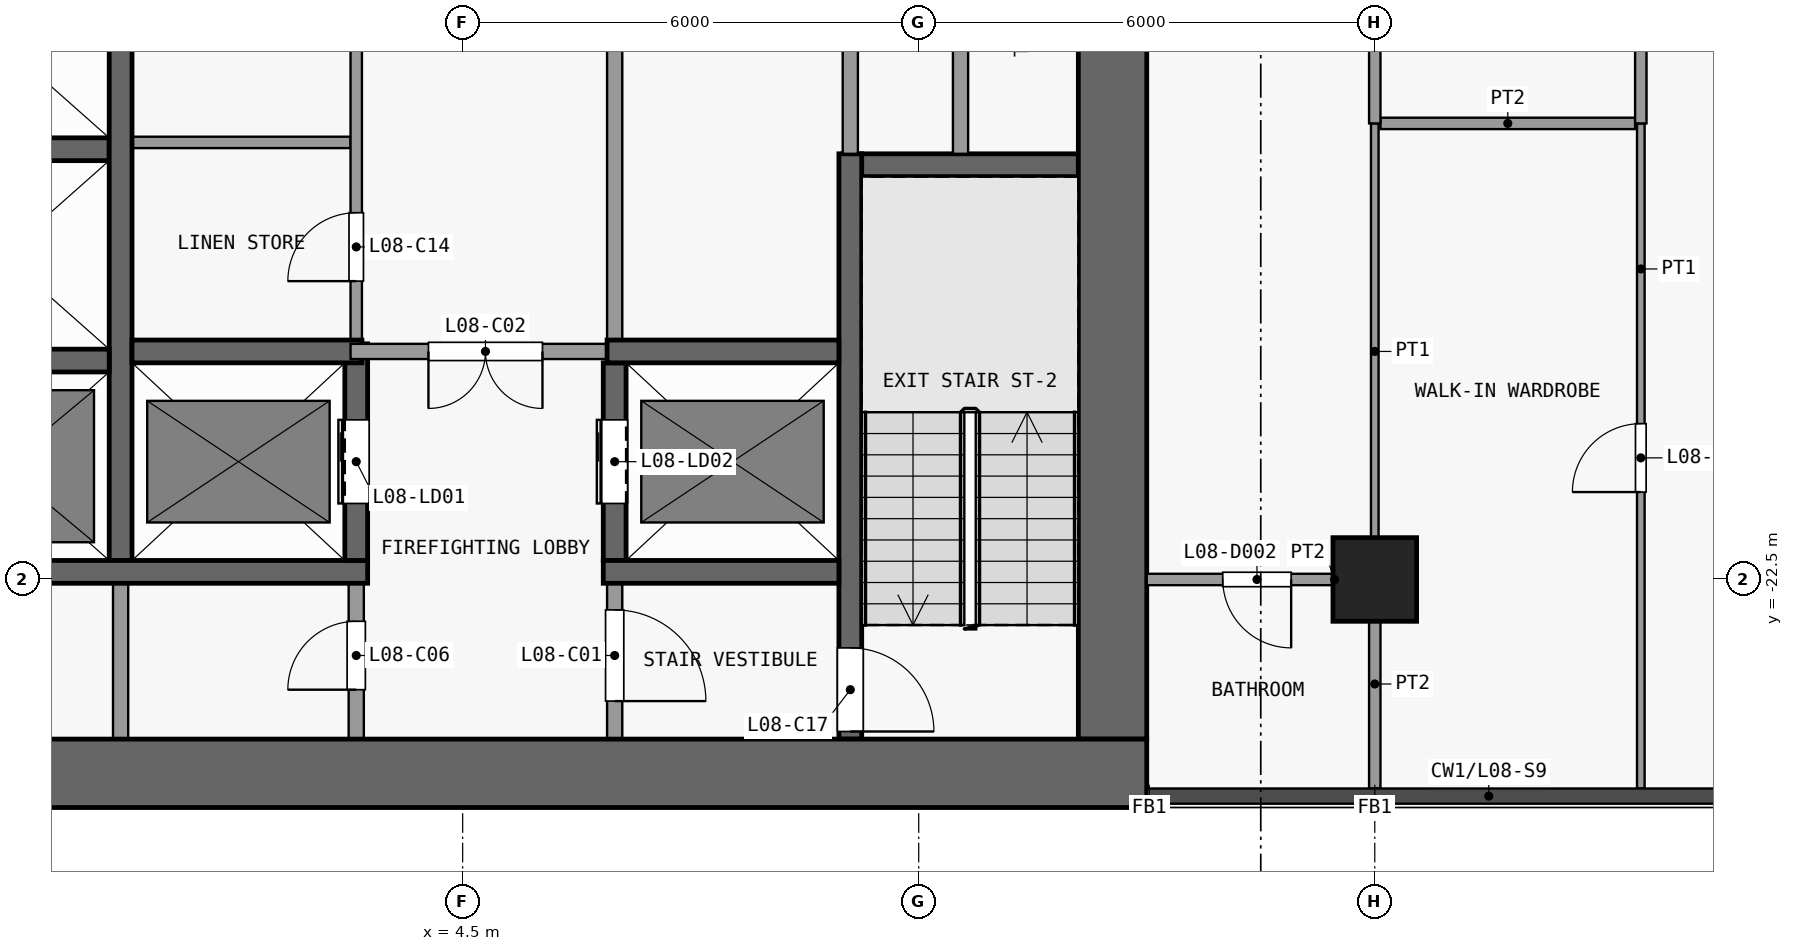
"""IFC4 building model, lengths in metres.
Left out: names, types, materials, properties, quantities, classifications, styles, units other than length and angle.
Written with IfcOpenShell. Run it as: python <this file> out.ifc"""

import sys

from ifc_helpers import new_model, si_unit, direction, frame, frame_2d, origin, origin_2d, place, context, subcontext, project, spatial, rectangle, extrude, element, fill, save


model = new_model("IFC4")
c1 = context("Model", 3, precision=1e-05, world=origin(), true_north=direction((0.0, 1.0)))
c2 = subcontext(c1, "Body", "Model", "MODEL_VIEW")
j1 = project(units=[si_unit("LENGTHUNIT", "METRE"), si_unit("PLANEANGLEUNIT", "RADIAN")], contexts=[c1])
p1 = place(None, origin())
s1 = spatial("IfcSite", under=j1, at=p1, CompositionType="ELEMENT")
p2 = place(p1, origin())
s2 = spatial("IfcBuilding", under=s1, at=p2, CompositionType="ELEMENT")
p3 = place(p2, frame((0.0, 0.0, 39.7)))
s3 = spatial("IfcBuildingStorey", under=s2, at=p3, CompositionType="ELEMENT", Elevation=39.7)
p4 = place(p3, frame((16.5, -22.5, 0.0), z_axis=(0.0, 0.0, 1.0), x_axis=(1.0, 0.0, 0.0)))
e1 = element("IfcColumn", 1, at=p4, inside=s3, PredefinedType="COLUMN", context=c2, shape_type="SweptSolid", body=[
    extrude(rectangle(XDim=1.1, YDim=1.1, at=origin_2d()), origin(), (0.0, 0.0, 1.0), 3.6),
])
p5 = place(p3, frame((-13.5, -25.05, 0.0), z_axis=(0.0, 0.0, 1.0), x_axis=(1.0, 0.0, 0.0)))
e2 = element("IfcWall", 2, at=p5, inside=s3, PredefinedType="SHEAR", context=c2, shape_type="SweptSolid", body=[
    extrude(rectangle(XDim=27.0, YDim=0.9, at=frame_2d((13.5, 0.0))), origin(), (0.0, 0.0, 1.0), 3.3),
])
p6 = place(p3, frame((13.05, -24.6, 0.0), z_axis=(0.0, 0.0, 1.0), x_axis=(0.0, 1.0, 0.0)))
e3 = element("IfcWall", 3, at=p6, inside=s3, PredefinedType="SHEAR", context=c2, shape_type="SweptSolid", body=[
    extrude(rectangle(XDim=16.1, YDim=0.9, at=frame_2d((8.05, 0.0))), origin(), (0.0, 0.0, 1.0), 3.3),
])
p7 = place(p3, frame((-2.95, -22.4, 0.0), z_axis=(0.0, 0.0, 1.0), x_axis=(1.0, 0.0, 0.0)))
e4 = element("IfcWall", 4, at=p7, inside=s3, PredefinedType="SHEAR", context=c2, shape_type="SweptSolid", body=[
    extrude(rectangle(XDim=6.2, YDim=0.3, at=frame_2d((3.1, 0.0))), origin(), (0.0, 0.0, 1.0), 3.3),
])
p8 = place(p3, frame((6.35, -22.4, 0.0), z_axis=(0.0, 0.0, 1.0), x_axis=(1.0, 0.0, 0.0)))
e5 = element("IfcWall", 5, at=p8, inside=s3, PredefinedType="SHEAR", context=c2, shape_type="SweptSolid", body=[
    extrude(rectangle(XDim=3.1, YDim=0.3, at=frame_2d((1.55, 0.0))), origin(), (0.0, 0.0, 1.0), 3.3),
])
p9 = place(p3, frame((-2.95, -19.62, 0.0), z_axis=(0.0, 0.0, 1.0), x_axis=(1.0, 0.0, 0.0)))
e6 = element("IfcWall", 6, at=p9, inside=s3, PredefinedType="SHEAR", context=c2, shape_type="SweptSolid", body=[
    extrude(rectangle(XDim=2.8, YDim=0.3, at=frame_2d((1.4, 0.0))), origin(), (0.0, 0.0, 1.0), 3.3),
])
p10 = place(p3, frame((0.15, -19.5, 0.0), z_axis=(0.0, 0.0, 1.0), x_axis=(1.0, 0.0, 0.0)))
e7 = element("IfcWall", 7, at=p10, inside=s3, PredefinedType="SHEAR", context=c2, shape_type="SweptSolid", body=[
    extrude(rectangle(XDim=3.025, YDim=0.3, at=frame_2d((1.513, 0.0))), origin(), (0.0, 0.0, 1.0), 3.3),
])
p11 = place(p3, frame((6.4, -19.5, 0.0), z_axis=(0.0, 0.0, 1.0), x_axis=(-1.0, 0.0, 0.0)))
e8 = element("IfcWall", 8, at=p11, inside=s3, PredefinedType="PARTITIONING", context=c2, shape_type="SweptSolid", body=[
    extrude(rectangle(XDim=3.375, YDim=0.2, at=frame_2d((1.688, 0.0))), origin(), (0.0, 0.0, 1.0), 3.3),
])
p12 = place(p11, frame((0.85, 0.0, 0.0)))
e9 = element("IfcOpeningElement", 9, at=p12, cuts=e8, PredefinedType="OPENING", context=c2, shape_type="SweptSolid", body=[
    extrude(rectangle(XDim=1.5, YDim=2.1, at=frame_2d((0.75, 1.05))), frame((0.0, 0.11, 0.0), z_axis=(0.0, -1.0, 0.0), x_axis=(1.0, 0.0, 0.0)), (0.0, 0.0, 1.0), 0.22),
])
p13 = place(p3, frame((6.4, -19.5, 0.0), z_axis=(0.0, 0.0, 1.0), x_axis=(1.0, 0.0, 0.0)))
e10 = element("IfcWall", 10, at=p13, inside=s3, PredefinedType="SHEAR", context=c2, shape_type="SweptSolid", body=[
    extrude(rectangle(XDim=3.05, YDim=0.3, at=frame_2d((1.525, 0.0))), origin(), (0.0, 0.0, 1.0), 3.3),
])
p14 = place(p3, frame((9.5, -17.05, 0.0), z_axis=(0.0, 0.0, 1.0), x_axis=(1.0, 0.0, 0.0)))
e11 = element("IfcWall", 11, at=p14, inside=s3, PredefinedType="SHEAR", context=c2, shape_type="SweptSolid", body=[
    extrude(rectangle(XDim=3.1, YDim=0.3, at=frame_2d((1.55, 0.0))), origin(), (0.0, 0.0, 1.0), 3.3),
])
p15 = place(p3, frame((-2.95, -16.84, 0.0), z_axis=(0.0, 0.0, 1.0), x_axis=(1.0, 0.0, 0.0)))
e12 = element("IfcWall", 12, at=p15, inside=s3, PredefinedType="SHEAR", context=c2, shape_type="SweptSolid", body=[
    extrude(rectangle(XDim=2.8, YDim=0.3, at=frame_2d((1.4, 0.0))), origin(), (0.0, 0.0, 1.0), 3.3),
])
p16 = place(p3, frame((0.15, -16.75, 0.0), z_axis=(0.0, 0.0, 1.0), x_axis=(1.0, 0.0, 0.0)))
e13 = element("IfcWall", 13, at=p16, inside=s3, PredefinedType="PARTITIONING", context=c2, shape_type="SweptSolid", body=[
    extrude(rectangle(XDim=2.875, YDim=0.15, at=frame_2d((1.438, 0.0))), origin(), (0.0, 0.0, 1.0), 3.3),
])
p17 = place(p3, frame((0.0, -24.6, 0.0), z_axis=(0.0, 0.0, 1.0), x_axis=(0.0, 1.0, 0.0)))
e14 = element("IfcWall", 14, at=p17, inside=s3, PredefinedType="PARTITIONING", context=c2, shape_type="SweptSolid", body=[
    extrude(rectangle(XDim=2.05, YDim=0.2, at=frame_2d((1.025, 0.0))), origin(), (0.0, 0.0, 1.0), 3.3),
])
p18 = place(p3, frame((0.0, -22.25, 0.0), z_axis=(0.0, 0.0, 1.0), x_axis=(0.0, 1.0, 0.0)))
e15 = element("IfcWall", 15, at=p18, inside=s3, PredefinedType="SHEAR", context=c2, shape_type="SweptSolid", body=[
    extrude(rectangle(XDim=13.75, YDim=0.3, at=frame_2d((6.875, 0.0))), origin(), (0.0, 0.0, 1.0), 3.3),
])
p19 = place(p3, frame((3.1, -24.6, 0.0), z_axis=(0.0, 0.0, 1.0), x_axis=(0.0, 1.0, 0.0)))
e16 = element("IfcWall", 16, at=p19, inside=s3, PredefinedType="PARTITIONING", context=c2, shape_type="SweptSolid", body=[
    extrude(rectangle(XDim=2.05, YDim=0.2, at=frame_2d((1.025, 0.0))), origin(), (0.0, 0.0, 1.0), 3.3),
])
p20 = place(p19, frame((0.65, 0.0, 0.0)))
e17 = element("IfcOpeningElement", 17, at=p20, cuts=e16, PredefinedType="OPENING", context=c2, shape_type="SweptSolid", body=[
    extrude(rectangle(XDim=0.9, YDim=2.1, at=frame_2d((0.45, 1.05))), frame((0.0, 0.11, 0.0), z_axis=(0.0, -1.0, 0.0), x_axis=(1.0, 0.0, 0.0)), (0.0, 0.0, 1.0), 0.22),
])
p21 = place(p3, frame((3.1, -22.25, 0.0), z_axis=(0.0, 0.0, 1.0), x_axis=(0.0, 1.0, 0.0)))
e18 = element("IfcWall", 18, at=p21, inside=s3, PredefinedType="SHEAR", context=c2, shape_type="SweptSolid", body=[
    extrude(rectangle(XDim=2.85, YDim=0.3, at=frame_2d((1.425, 0.0))), origin(), (0.0, 0.0, 1.0), 3.3),
])
p22 = place(p21, frame((0.75, 0.0, 0.0)))
e19 = element("IfcOpeningElement", 19, at=p22, cuts=e18, PredefinedType="OPENING", context=c2, shape_type="SweptSolid", body=[
    extrude(rectangle(XDim=1.1, YDim=2.1, at=frame_2d((0.55, 1.05))), frame((0.0, 0.16, 0.0), z_axis=(0.0, -1.0, 0.0), x_axis=(1.0, 0.0, 0.0)), (0.0, 0.0, 1.0), 0.32),
])
p23 = place(p3, frame((3.1, -19.4, 0.0), z_axis=(0.0, 0.0, 1.0), x_axis=(0.0, 1.0, 0.0)))
e20 = element("IfcWall", 20, at=p23, inside=s3, PredefinedType="PARTITIONING", context=c2, shape_type="SweptSolid", body=[
    extrude(rectangle(XDim=10.9, YDim=0.15, at=frame_2d((5.45, 0.0))), origin(), (0.0, 0.0, 1.0), 3.3),
])
p24 = place(p23, frame((0.825, 0.0, 0.0)))
e21 = element("IfcOpeningElement", 21, at=p24, cuts=e20, PredefinedType="OPENING", context=c2, shape_type="SweptSolid", body=[
    extrude(rectangle(XDim=0.9, YDim=2.1, at=frame_2d((0.45, 1.05))), frame((0.0, 0.085, 0.0), z_axis=(0.0, -1.0, 0.0), x_axis=(1.0, 0.0, 0.0)), (0.0, 0.0, 1.0), 0.17),
])
p25 = place(p23, frame((6.175, 0.0, 0.0)))
e22 = element("IfcOpeningElement", 22, at=p25, cuts=e20, PredefinedType="OPENING", context=c2, shape_type="SweptSolid", body=[
    extrude(rectangle(XDim=1.2, YDim=2.1, at=frame_2d((0.6, 1.05))), frame((0.0, 0.085, 0.0), z_axis=(0.0, -1.0, 0.0), x_axis=(1.0, 0.0, 0.0)), (0.0, 0.0, 1.0), 0.17),
])
p26 = place(p3, frame((6.5, -22.55, 0.0), z_axis=(0.0, 0.0, 1.0), x_axis=(0.0, -1.0, 0.0)))
e23 = element("IfcWall", 23, at=p26, inside=s3, PredefinedType="PARTITIONING", context=c2, shape_type="SweptSolid", body=[
    extrude(rectangle(XDim=2.05, YDim=0.2, at=frame_2d((1.025, 0.0))), origin(), (0.0, 0.0, 1.0), 3.3),
])
p27 = place(p26, frame((0.35, 0.0, 0.0)))
e24 = element("IfcOpeningElement", 24, at=p27, cuts=e23, PredefinedType="OPENING", context=c2, shape_type="SweptSolid", body=[
    extrude(rectangle(XDim=1.2, YDim=2.1, at=frame_2d((0.6, 1.05))), frame((0.0, 0.11, 0.0), z_axis=(0.0, -1.0, 0.0), x_axis=(1.0, 0.0, 0.0)), (0.0, 0.0, 1.0), 0.22),
])
p28 = place(p3, frame((6.5, -22.25, 0.0), z_axis=(0.0, 0.0, 1.0), x_axis=(0.0, 1.0, 0.0)))
e25 = element("IfcWall", 25, at=p28, inside=s3, PredefinedType="SHEAR", context=c2, shape_type="SweptSolid", body=[
    extrude(rectangle(XDim=2.6, YDim=0.3, at=frame_2d((1.3, 0.0))), origin(), (0.0, 0.0, 1.0), 3.3),
])
p29 = place(p28, frame((0.75, 0.0, 0.0)))
e26 = element("IfcOpeningElement", 26, at=p29, cuts=e25, PredefinedType="OPENING", context=c2, shape_type="SweptSolid", body=[
    extrude(rectangle(XDim=1.1, YDim=2.1, at=frame_2d((0.55, 1.05))), frame((0.0, 0.16, 0.0), z_axis=(0.0, -1.0, 0.0), x_axis=(1.0, 0.0, 0.0)), (0.0, 0.0, 1.0), 0.32),
])
p30 = place(p3, frame((6.5, -8.5, 0.0), z_axis=(0.0, 0.0, 1.0), x_axis=(0.0, -1.0, 0.0)))
e27 = element("IfcWall", 27, at=p30, inside=s3, PredefinedType="PARTITIONING", context=c2, shape_type="SweptSolid", body=[
    extrude(rectangle(XDim=10.85, YDim=0.2, at=frame_2d((5.425, 0.0))), origin(), (0.0, 0.0, 1.0), 3.3),
])
p31 = place(p30, frame((4.9, 0.0, 0.0)))
e28 = element("IfcOpeningElement", 28, at=p31, cuts=e27, PredefinedType="OPENING", context=c2, shape_type="SweptSolid", body=[
    extrude(rectangle(XDim=1.2, YDim=2.1, at=frame_2d((0.6, 1.05))), frame((0.0, 0.11, 0.0), z_axis=(0.0, -1.0, 0.0), x_axis=(1.0, 0.0, 0.0)), (0.0, 0.0, 1.0), 0.22),
])
p32 = place(p3, frame((9.6, -16.9, 0.0), z_axis=(0.0, 0.0, 1.0), x_axis=(0.0, -1.0, 0.0)))
e29 = element("IfcWall", 29, at=p32, inside=s3, PredefinedType="SHEAR", context=c2, shape_type="SweptSolid", body=[
    extrude(rectangle(XDim=7.7, YDim=0.3, at=frame_2d((3.85, 0.0))), origin(), (0.0, 0.0, 1.0), 3.3),
])
p33 = place(p32, frame((6.5, 0.0, 0.0)))
e30 = element("IfcOpeningElement", 30, at=p33, cuts=e29, PredefinedType="OPENING", context=c2, shape_type="SweptSolid", body=[
    extrude(rectangle(XDim=1.1, YDim=2.1, at=frame_2d((0.55, 1.05))), frame((0.0, 0.16, 0.0), z_axis=(0.0, -1.0, 0.0), x_axis=(1.0, 0.0, 0.0)), (0.0, 0.0, 1.0), 0.32),
])
p34 = place(p3, frame((9.6, -16.9, 0.0), z_axis=(0.0, 0.0, 1.0), x_axis=(0.0, 1.0, 0.0)))
e31 = element("IfcWall", 31, at=p34, inside=s3, PredefinedType="PARTITIONING", context=c2, shape_type="SweptSolid", body=[
    extrude(rectangle(XDim=8.4, YDim=0.2, at=frame_2d((4.2, 0.0))), origin(), (0.0, 0.0, 1.0), 3.3),
])
p35 = place(p3, frame((11.05, -10.5, 0.0), z_axis=(0.0, 0.0, 1.0), x_axis=(0.0, -1.0, 0.0)))
e32 = element("IfcWall", 32, at=p35, inside=s3, PredefinedType="PARTITIONING", context=c2, shape_type="SweptSolid", body=[
    extrude(rectangle(XDim=6.4, YDim=0.2, at=frame_2d((3.2, 0.0))), origin(), (0.0, 0.0, 1.0), 3.3),
])
p36 = place(p35, frame((2.875, 0.0, 0.0)))
e33 = element("IfcOpeningElement", 33, at=p36, cuts=e32, PredefinedType="OPENING", context=c2, shape_type="SweptSolid", body=[
    extrude(rectangle(XDim=0.9, YDim=2.1, at=frame_2d((0.45, 1.05))), frame((0.0, 0.11, 0.0), z_axis=(0.0, -1.0, 0.0), x_axis=(1.0, 0.0, 0.0)), (0.0, 0.0, 1.0), 0.22),
])
p37 = place(p3, frame((13.5, -22.5, 0.0), z_axis=(0.0, 0.0, 1.0), x_axis=(1.0, 0.0, 0.0)))
e34 = element("IfcWall", 34, at=p37, inside=s3, PredefinedType="PARTITIONING", context=c2, shape_type="SweptSolid", body=[
    extrude(rectangle(XDim=2.925, YDim=0.15, at=frame_2d((1.462, 0.0))), origin(), (0.0, 0.0, 1.0), 3.3),
])
p38 = place(p37, frame((1.0, 0.0, 0.0)))
e35 = element("IfcOpeningElement", 35, at=p38, cuts=e34, PredefinedType="OPENING", context=c2, shape_type="SweptSolid", body=[
    extrude(rectangle(XDim=0.9, YDim=2.1, at=frame_2d((0.45, 1.05))), frame((0.0, 0.085, 0.0), z_axis=(0.0, -1.0, 0.0), x_axis=(1.0, 0.0, 0.0)), (0.0, 0.0, 1.0), 0.17),
])
p39 = place(p3, frame((16.575, -16.5, 0.0), z_axis=(0.0, 0.0, 1.0), x_axis=(1.0, 0.0, 0.0)))
e36 = element("IfcWall", 36, at=p39, inside=s3, PredefinedType="PARTITIONING", context=c2, shape_type="SweptSolid", body=[
    extrude(rectangle(XDim=3.35, YDim=0.15, at=frame_2d((1.675, 0.0))), origin(), (0.0, 0.0, 1.0), 3.3),
])
p40 = place(p3, frame((16.5, -22.5, 0.0), z_axis=(0.0, 0.0, 1.0), x_axis=(0.0, 1.0, 0.0)))
e37 = element("IfcWall", 37, at=p40, inside=s3, PredefinedType="PARTITIONING", context=c2, shape_type="SweptSolid", body=[
    extrude(rectangle(XDim=6.0, YDim=0.1, at=frame_2d((3.0, 0.0))), origin(), (0.0, 0.0, 1.0), 3.3),
])
p41 = place(p3, frame((16.5, -25.25, 0.0), z_axis=(0.0, 0.0, 1.0), x_axis=(0.0, 1.0, 0.0)))
e38 = element("IfcWall", 38, at=p41, inside=s3, PredefinedType="PARTITIONING", context=c2, shape_type="SweptSolid", body=[
    extrude(rectangle(XDim=2.75, YDim=0.15, at=frame_2d((1.375, 0.0))), origin(), (0.0, 0.0, 1.0), 3.3),
])
p42 = place(p3, frame((16.5, -16.5, 0.0), z_axis=(0.0, 0.0, 1.0), x_axis=(0.0, 1.0, 0.0)))
e39 = element("IfcWall", 39, at=p42, inside=s3, PredefinedType="PARTITIONING", context=c2, shape_type="SweptSolid", body=[
    extrude(rectangle(XDim=8.5, YDim=0.15, at=frame_2d((4.25, 0.0))), origin(), (0.0, 0.0, 1.0), 3.3),
])
p43 = place(p42, frame((5.3, 0.0, 0.0)))
e40 = element("IfcOpeningElement", 40, at=p43, cuts=e39, PredefinedType="OPENING", context=c2, shape_type="SweptSolid", body=[
    extrude(rectangle(XDim=0.9, YDim=2.1, at=frame_2d((0.45, 1.05))), frame((0.0, 0.085, 0.0), z_axis=(0.0, -1.0, 0.0), x_axis=(1.0, 0.0, 0.0)), (0.0, 0.0, 1.0), 0.17),
])
p44 = place(p3, frame((20.0, -25.25, 0.0), z_axis=(0.0, 0.0, 1.0), x_axis=(0.0, 1.0, 0.0)))
e41 = element("IfcWall", 41, at=p44, inside=s3, PredefinedType="PARTITIONING", context=c2, shape_type="SweptSolid", body=[
    extrude(rectangle(XDim=8.75, YDim=0.1, at=frame_2d((4.375, 0.0))), origin(), (0.0, 0.0, 1.0), 3.3),
])
p45 = place(p44, frame((3.9, 0.0, 0.0)))
e42 = element("IfcOpeningElement", 42, at=p45, cuts=e41, PredefinedType="OPENING", context=c2, shape_type="SweptSolid", body=[
    extrude(rectangle(XDim=0.9, YDim=2.1, at=frame_2d((0.45, 1.05))), frame((0.0, 0.06, 0.0), z_axis=(0.0, -1.0, 0.0), x_axis=(1.0, 0.0, 0.0)), (0.0, 0.0, 1.0), 0.12),
])
p46 = place(p3, frame((20.0, -16.5, 0.0), z_axis=(0.0, 0.0, 1.0), x_axis=(0.0, 1.0, 0.0)))
e43 = element("IfcWall", 43, at=p46, inside=s3, PredefinedType="PARTITIONING", context=c2, shape_type="SweptSolid", body=[
    extrude(rectangle(XDim=2.925, YDim=0.15, at=frame_2d((1.462, 0.0))), origin(), (0.0, 0.0, 1.0), 3.3),
])
p47 = place(p46, frame((1.0, 0.0, 0.0)))
e44 = element("IfcOpeningElement", 44, at=p47, cuts=e43, PredefinedType="OPENING", context=c2, shape_type="SweptSolid", body=[
    extrude(rectangle(XDim=0.9, YDim=2.1, at=frame_2d((0.45, 1.05))), frame((0.0, 0.085, 0.0), z_axis=(0.0, -1.0, 0.0), x_axis=(1.0, 0.0, 0.0)), (0.0, 0.0, 1.0), 0.17),
])
p48 = place(p22, origin())
e45 = element("IfcDoor", 45, at=p48, inside=s3, OperationType="DOUBLE_DOOR_SLIDING", PredefinedType="DOOR", context=c2, shape_type="SweptSolid", body=[
    extrude(rectangle(XDim=1.1, YDim=2.1, at=frame_2d((0.55, 1.05))), frame((0.0, 0.025, 0.0), z_axis=(0.0, -1.0, 0.0), x_axis=(1.0, 0.0, 0.0)), (0.0, 0.0, 1.0), 0.05),
])
fill(e19, e45)
p49 = place(p29, origin())
e46 = element("IfcDoor", 46, at=p49, inside=s3, OperationType="DOUBLE_DOOR_SLIDING", PredefinedType="DOOR", context=c2, shape_type="SweptSolid", body=[
    extrude(rectangle(XDim=1.1, YDim=2.1, at=frame_2d((0.55, 1.05))), frame((0.0, 0.025, 0.0), z_axis=(0.0, -1.0, 0.0), x_axis=(1.0, 0.0, 0.0)), (0.0, 0.0, 1.0), 0.05),
])
fill(e26, e46)
p50 = place(p27, origin())
e47 = element("IfcDoor", 47, at=p50, inside=s3, OperationType="SINGLE_SWING_RIGHT", PredefinedType="DOOR", context=c2, shape_type="SweptSolid", body=[
    extrude(rectangle(XDim=1.2, YDim=2.1, at=frame_2d((0.6, 1.05))), frame((0.0, 0.025, 0.0), z_axis=(0.0, -1.0, 0.0), x_axis=(1.0, 0.0, 0.0)), (0.0, 0.0, 1.0), 0.05),
])
fill(e24, e47)
p51 = place(p12, origin())
e48 = element("IfcDoor", 48, at=p51, inside=s3, OperationType="DOUBLE_DOOR_SINGLE_SWING", PredefinedType="DOOR", context=c2, shape_type="SweptSolid", body=[
    extrude(rectangle(XDim=1.5, YDim=2.1, at=frame_2d((0.75, 1.05))), frame((0.0, 0.025, 0.0), z_axis=(0.0, -1.0, 0.0), x_axis=(1.0, 0.0, 0.0)), (0.0, 0.0, 1.0), 0.05),
])
fill(e9, e48)
p52 = place(p20, origin())
e49 = element("IfcDoor", 49, at=p52, inside=s3, OperationType="SINGLE_SWING_LEFT", PredefinedType="DOOR", context=c2, shape_type="SweptSolid", body=[
    extrude(rectangle(XDim=0.9, YDim=2.1, at=frame_2d((0.45, 1.05))), frame((0.0, 0.025, 0.0), z_axis=(0.0, -1.0, 0.0), x_axis=(1.0, 0.0, 0.0)), (0.0, 0.0, 1.0), 0.05),
])
fill(e17, e49)
p53 = place(p24, origin())
e50 = element("IfcDoor", 50, at=p53, inside=s3, OperationType="SINGLE_SWING_LEFT", PredefinedType="DOOR", context=c2, shape_type="SweptSolid", body=[
    extrude(rectangle(XDim=0.9, YDim=2.1, at=frame_2d((0.45, 1.05))), frame((0.0, 0.025, 0.0), z_axis=(0.0, -1.0, 0.0), x_axis=(1.0, 0.0, 0.0)), (0.0, 0.0, 1.0), 0.05),
])
fill(e21, e50)
p54 = place(p33, origin())
e51 = element("IfcDoor", 51, at=p54, inside=s3, OperationType="SINGLE_SWING_RIGHT", PredefinedType="DOOR", context=c2, shape_type="SweptSolid", body=[
    extrude(rectangle(XDim=1.1, YDim=2.1, at=frame_2d((0.55, 1.05))), frame((0.0, 0.025, 0.0), z_axis=(0.0, -1.0, 0.0), x_axis=(1.0, 0.0, 0.0)), (0.0, 0.0, 1.0), 0.05),
])
fill(e30, e51)
p55 = place(p38, origin())
e52 = element("IfcDoor", 52, at=p55, inside=s3, OperationType="SINGLE_SWING_RIGHT", PredefinedType="DOOR", context=c2, shape_type="SweptSolid", body=[
    extrude(rectangle(XDim=0.9, YDim=2.1, at=frame_2d((0.45, 1.05))), frame((0.0, 0.025, 0.0), z_axis=(0.0, -1.0, 0.0), x_axis=(1.0, 0.0, 0.0)), (0.0, 0.0, 1.0), 0.05),
])
fill(e35, e52)
p56 = place(p45, origin())
e53 = element("IfcDoor", 53, at=p56, inside=s3, OperationType="SINGLE_SWING_RIGHT", PredefinedType="DOOR", context=c2, shape_type="SweptSolid", body=[
    extrude(rectangle(XDim=0.9, YDim=2.1, at=frame_2d((0.45, 1.05))), frame((0.0, 0.025, 0.0), z_axis=(0.0, -1.0, 0.0), x_axis=(1.0, 0.0, 0.0)), (0.0, 0.0, 1.0), 0.05),
])
fill(e42, e53)
save(model, sys.argv[1])
